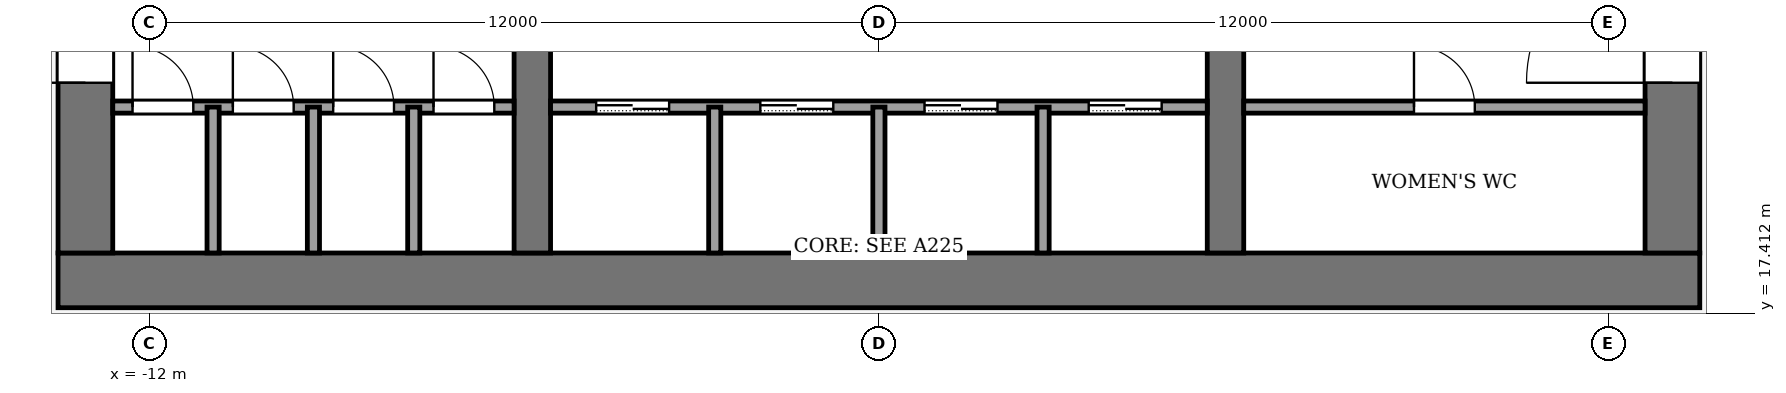
"""IFC4 building model, lengths in metres.
Left out: names, types, materials, properties, quantities, classifications, styles, units other than length and angle.
Written with IfcOpenShell. Run it as: python <this file> out.ifc"""

import sys

from ifc_helpers import new_model, si_unit, direction, frame, frame_2d, origin, place, context, subcontext, project, spatial, rectangle, extrude, element, fill, save


model = new_model("IFC4")
c1 = context("Model", 3, precision=1e-05, world=origin(), true_north=direction((0.0, 1.0)))
c2 = subcontext(c1, "Body", "Model", "MODEL_VIEW")
j1 = project(units=[si_unit("LENGTHUNIT", "METRE"), si_unit("PLANEANGLEUNIT", "RADIAN")], contexts=[c1])
p1 = place(None, origin())
s1 = spatial("IfcSite", under=j1, at=p1, CompositionType="ELEMENT")
p2 = place(p1, origin())
s2 = spatial("IfcBuilding", under=s1, at=p2, CompositionType="ELEMENT")
p3 = place(p2, frame((0.0, 0.0, 222.0)))
s3 = spatial("IfcBuildingStorey", under=s2, at=p3, CompositionType="ELEMENT", Elevation=222.0)
p4 = place(p3, frame((-13.5, 17.95, -0.13), z_axis=(0.0, 0.0, 1.0), x_axis=(1.0, 0.0, 0.0)))
e1 = element("IfcWall", 1, at=p4, inside=s3, PredefinedType="SHEAR", context=c2, shape_type="SweptSolid", body=[
    extrude(rectangle(XDim=27.0, YDim=0.9, at=frame_2d((13.5, 0.0))), origin(), (0.0, 0.0, 1.0), 3.88),
])
p5 = place(p3, frame((-13.05, 18.4, -0.13), z_axis=(0.0, 0.0, 1.0), x_axis=(0.0, 1.0, 0.0)))
e2 = element("IfcWall", 2, at=p5, inside=s3, PredefinedType="SHEAR", context=c2, shape_type="SweptSolid", body=[
    extrude(rectangle(XDim=19.2, YDim=0.9, at=frame_2d((9.6, 0.0))), origin(), (0.0, 0.0, 1.0), 3.88),
])
p6 = place(p5, frame((2.8, 0.0, 0.13)))
e3 = element("IfcOpeningElement", 3, at=p6, cuts=e2, PredefinedType="OPENING", context=c2, shape_type="SweptSolid", body=[
    extrude(rectangle(XDim=2.4, YDim=2.4, at=frame_2d((1.2, 1.2))), frame((0.0, 0.46, 0.0), z_axis=(0.0, -1.0, 0.0), x_axis=(1.0, 0.0, 0.0)), (0.0, 0.0, 1.0), 0.92),
])
p7 = place(p5, frame((13.4, 0.0, 0.13)))
e4 = element("IfcOpeningElement", 4, at=p7, cuts=e2, PredefinedType="OPENING", context=c2, shape_type="SweptSolid", body=[
    extrude(rectangle(XDim=1.4, YDim=2.2, at=frame_2d((0.7, 1.1))), frame((0.0, 0.46, 0.0), z_axis=(0.0, -1.0, 0.0), x_axis=(1.0, 0.0, 0.0)), (0.0, 0.0, 1.0), 0.92),
])
p8 = place(p3, frame((13.05, 18.4, -0.13), z_axis=(0.0, 0.0, 1.0), x_axis=(0.0, 1.0, 0.0)))
e5 = element("IfcWall", 5, at=p8, inside=s3, PredefinedType="SHEAR", context=c2, shape_type="SweptSolid", body=[
    extrude(rectangle(XDim=19.2, YDim=0.9, at=frame_2d((9.6, 0.0))), origin(), (0.0, 0.0, 1.0), 3.88),
])
p9 = place(p8, frame((2.8, 0.0, 0.13)))
e6 = element("IfcOpeningElement", 6, at=p9, cuts=e5, PredefinedType="OPENING", context=c2, shape_type="SweptSolid", body=[
    extrude(rectangle(XDim=2.4, YDim=2.4, at=frame_2d((1.2, 1.2))), frame((0.0, 0.46, 0.0), z_axis=(0.0, -1.0, 0.0), x_axis=(1.0, 0.0, 0.0)), (0.0, 0.0, 1.0), 0.92),
])
p10 = place(p8, frame((13.3, 0.0, 0.13)))
e7 = element("IfcOpeningElement", 7, at=p10, cuts=e5, PredefinedType="OPENING", context=c2, shape_type="SweptSolid", body=[
    extrude(rectangle(XDim=2.4, YDim=2.4, at=frame_2d((1.2, 1.2))), frame((0.0, 0.46, 0.0), z_axis=(0.0, -1.0, 0.0), x_axis=(1.0, 0.0, 0.0)), (0.0, 0.0, 1.0), 0.92),
])
p11 = place(p3, frame((-5.7, 18.4, -0.13), z_axis=(0.0, 0.0, 1.0), x_axis=(0.0, 1.0, 0.0)))
e8 = element("IfcWall", 8, at=p11, inside=s3, PredefinedType="SHEAR", context=c2, shape_type="SweptSolid", body=[
    extrude(rectangle(XDim=19.2, YDim=0.6, at=frame_2d((9.6, 0.0))), origin(), (0.0, 0.0, 1.0), 3.88),
])
p12 = place(p11, frame((8.35, 0.0, 0.13)))
e9 = element("IfcOpeningElement", 9, at=p12, cuts=e8, PredefinedType="OPENING", context=c2, shape_type="SweptSolid", body=[
    extrude(rectangle(XDim=0.9, YDim=2.1, at=frame_2d((0.45, 1.05))), frame((0.0, 0.31, 0.0), z_axis=(0.0, -1.0, 0.0), x_axis=(1.0, 0.0, 0.0)), (0.0, 0.0, 1.0), 0.62),
])
p13 = place(p3, frame((5.7, 18.4, -0.13), z_axis=(0.0, 0.0, 1.0), x_axis=(0.0, 1.0, 0.0)))
e10 = element("IfcWall", 10, at=p13, inside=s3, PredefinedType="SHEAR", context=c2, shape_type="SweptSolid", body=[
    extrude(rectangle(XDim=19.2, YDim=0.6, at=frame_2d((9.6, 0.0))), origin(), (0.0, 0.0, 1.0), 3.88),
])
p14 = place(p13, frame((8.35, 0.0, 0.13)))
e11 = element("IfcOpeningElement", 11, at=p14, cuts=e10, PredefinedType="OPENING", context=c2, shape_type="SweptSolid", body=[
    extrude(rectangle(XDim=0.9, YDim=2.1, at=frame_2d((0.45, 1.05))), frame((0.0, 0.31, 0.0), z_axis=(0.0, -1.0, 0.0), x_axis=(1.0, 0.0, 0.0)), (0.0, 0.0, 1.0), 0.62),
])
p15 = place(p13, frame((13.3, 0.0, 0.13)))
e12 = element("IfcOpeningElement", 12, at=p15, cuts=e10, PredefinedType="OPENING", context=c2, shape_type="SweptSolid", body=[
    extrude(rectangle(XDim=2.4, YDim=2.4, at=frame_2d((1.2, 1.2))), frame((0.0, 0.31, 0.0), z_axis=(0.0, -1.0, 0.0), x_axis=(1.0, 0.0, 0.0)), (0.0, 0.0, 1.0), 0.62),
])
p16 = place(p3, frame((-12.6, 20.8, 0.0), z_axis=(0.0, 0.0, 1.0), x_axis=(1.0, 0.0, 0.0)))
e13 = element("IfcWall", 13, at=p16, inside=s3, PredefinedType="PARTITIONING", context=c2, shape_type="SweptSolid", body=[
    extrude(rectangle(XDim=6.6, YDim=0.2, at=frame_2d((3.3, 0.0))), origin(), (0.0, 0.0, 1.0), 3.75),
])
p17 = place(p16, frame((0.325, 0.0, 0.0)))
e14 = element("IfcOpeningElement", 14, at=p17, cuts=e13, PredefinedType="OPENING", context=c2, shape_type="SweptSolid", body=[
    extrude(rectangle(XDim=1.0, YDim=2.1, at=frame_2d((0.5, 1.05))), frame((0.0, 0.11, 0.0), z_axis=(0.0, -1.0, 0.0), x_axis=(1.0, 0.0, 0.0)), (0.0, 0.0, 1.0), 0.22),
])
p18 = place(p16, frame((1.975, 0.0, 0.0)))
e15 = element("IfcOpeningElement", 15, at=p18, cuts=e13, PredefinedType="OPENING", context=c2, shape_type="SweptSolid", body=[
    extrude(rectangle(XDim=1.0, YDim=2.1, at=frame_2d((0.5, 1.05))), frame((0.0, 0.11, 0.0), z_axis=(0.0, -1.0, 0.0), x_axis=(1.0, 0.0, 0.0)), (0.0, 0.0, 1.0), 0.22),
])
p19 = place(p16, frame((3.625, 0.0, 0.0)))
e16 = element("IfcOpeningElement", 16, at=p19, cuts=e13, PredefinedType="OPENING", context=c2, shape_type="SweptSolid", body=[
    extrude(rectangle(XDim=1.0, YDim=2.1, at=frame_2d((0.5, 1.05))), frame((0.0, 0.11, 0.0), z_axis=(0.0, -1.0, 0.0), x_axis=(1.0, 0.0, 0.0)), (0.0, 0.0, 1.0), 0.22),
])
p20 = place(p16, frame((5.275, 0.0, 0.0)))
e17 = element("IfcOpeningElement", 17, at=p20, cuts=e13, PredefinedType="OPENING", context=c2, shape_type="SweptSolid", body=[
    extrude(rectangle(XDim=1.0, YDim=2.1, at=frame_2d((0.5, 1.05))), frame((0.0, 0.11, 0.0), z_axis=(0.0, -1.0, 0.0), x_axis=(1.0, 0.0, 0.0)), (0.0, 0.0, 1.0), 0.22),
])
p21 = place(p3, frame((-5.4, 20.8, 0.0), z_axis=(0.0, 0.0, 1.0), x_axis=(1.0, 0.0, 0.0)))
e18 = element("IfcWall", 18, at=p21, inside=s3, PredefinedType="PARTITIONING", context=c2, shape_type="SweptSolid", body=[
    extrude(rectangle(XDim=10.8, YDim=0.2, at=frame_2d((5.4, 0.0))), origin(), (0.0, 0.0, 1.0), 3.75),
])
p22 = place(p21, frame((0.75, 0.0, 0.0)))
e19 = element("IfcOpeningElement", 19, at=p22, cuts=e18, PredefinedType="OPENING", context=c2, shape_type="SweptSolid", body=[
    extrude(rectangle(XDim=1.2, YDim=2.2, at=frame_2d((0.6, 1.1))), frame((0.0, 0.11, 0.0), z_axis=(0.0, -1.0, 0.0), x_axis=(1.0, 0.0, 0.0)), (0.0, 0.0, 1.0), 0.22),
])
p23 = place(p21, frame((3.45, 0.0, 0.0)))
e20 = element("IfcOpeningElement", 20, at=p23, cuts=e18, PredefinedType="OPENING", context=c2, shape_type="SweptSolid", body=[
    extrude(rectangle(XDim=1.2, YDim=2.2, at=frame_2d((0.6, 1.1))), frame((0.0, 0.11, 0.0), z_axis=(0.0, -1.0, 0.0), x_axis=(1.0, 0.0, 0.0)), (0.0, 0.0, 1.0), 0.22),
])
p24 = place(p21, frame((6.15, 0.0, 0.0)))
e21 = element("IfcOpeningElement", 21, at=p24, cuts=e18, PredefinedType="OPENING", context=c2, shape_type="SweptSolid", body=[
    extrude(rectangle(XDim=1.2, YDim=2.2, at=frame_2d((0.6, 1.1))), frame((0.0, 0.11, 0.0), z_axis=(0.0, -1.0, 0.0), x_axis=(1.0, 0.0, 0.0)), (0.0, 0.0, 1.0), 0.22),
])
p25 = place(p21, frame((8.85, 0.0, 0.0)))
e22 = element("IfcOpeningElement", 22, at=p25, cuts=e18, PredefinedType="OPENING", context=c2, shape_type="SweptSolid", body=[
    extrude(rectangle(XDim=1.2, YDim=2.2, at=frame_2d((0.6, 1.1))), frame((0.0, 0.11, 0.0), z_axis=(0.0, -1.0, 0.0), x_axis=(1.0, 0.0, 0.0)), (0.0, 0.0, 1.0), 0.22),
])
p26 = place(p3, frame((6.0, 20.8, 0.0), z_axis=(0.0, 0.0, 1.0), x_axis=(1.0, 0.0, 0.0)))
e23 = element("IfcWall", 23, at=p26, inside=s3, PredefinedType="PARTITIONING", context=c2, shape_type="SweptSolid", body=[
    extrude(rectangle(XDim=6.6, YDim=0.2, at=frame_2d((3.3, 0.0))), origin(), (0.0, 0.0, 1.0), 3.75),
])
p27 = place(p26, frame((2.8, 0.0, 0.0)))
e24 = element("IfcOpeningElement", 24, at=p27, cuts=e23, PredefinedType="OPENING", context=c2, shape_type="SweptSolid", body=[
    extrude(rectangle(XDim=1.0, YDim=2.1, at=frame_2d((0.5, 1.05))), frame((0.0, 0.11, 0.0), z_axis=(0.0, -1.0, 0.0), x_axis=(1.0, 0.0, 0.0)), (0.0, 0.0, 1.0), 0.22),
])
for number, where, z_axis, x_axis in (
    (25, (-10.95, 18.4, 0.0), (0.0, 0.0, 1.0), (0.0, 1.0, 0.0)),
    (26, (-9.3, 18.4, 0.0), (0.0, 0.0, 1.0), (0.0, 1.0, 0.0)),
    (27, (-7.65, 18.4, 0.0), (0.0, 0.0, 1.0), (0.0, 1.0, 0.0)),
    (28, (-2.7, 18.4, 0.0), (0.0, 0.0, 1.0), (0.0, 1.0, 0.0)),
    (29, (0.0, 18.4, 0.0), (0.0, 0.0, 1.0), (0.0, 1.0, 0.0)),
    (30, (2.7, 18.4, 0.0), (0.0, 0.0, 1.0), (0.0, 1.0, 0.0)),
):
    element("IfcWall", number, at=place(p3, frame(where, z_axis=z_axis, x_axis=x_axis)), inside=s3, PredefinedType="PARTITIONING", context=c2, shape_type="SweptSolid", body=[
        extrude(rectangle(XDim=2.4, YDim=0.2, at=frame_2d((1.2, 0.0))), origin(), (0.0, 0.0, 1.0), 3.75),
    ])
p28 = place(p22, origin())
e31 = element("IfcDoor", 31, at=p28, inside=s3, OperationType="SLIDING_TO_LEFT", PredefinedType="DOOR", context=c2, shape_type="SweptSolid", body=[
    extrude(rectangle(XDim=1.2, YDim=2.2, at=frame_2d((0.6, 1.1))), frame((0.0, 0.025, 0.0), z_axis=(0.0, -1.0, 0.0), x_axis=(1.0, 0.0, 0.0)), (0.0, 0.0, 1.0), 0.05),
])
fill(e19, e31)
p29 = place(p23, origin())
e32 = element("IfcDoor", 32, at=p29, inside=s3, OperationType="SLIDING_TO_LEFT", PredefinedType="DOOR", context=c2, shape_type="SweptSolid", body=[
    extrude(rectangle(XDim=1.2, YDim=2.2, at=frame_2d((0.6, 1.1))), frame((0.0, 0.025, 0.0), z_axis=(0.0, -1.0, 0.0), x_axis=(1.0, 0.0, 0.0)), (0.0, 0.0, 1.0), 0.05),
])
fill(e20, e32)
p30 = place(p24, origin())
e33 = element("IfcDoor", 33, at=p30, inside=s3, OperationType="SLIDING_TO_LEFT", PredefinedType="DOOR", context=c2, shape_type="SweptSolid", body=[
    extrude(rectangle(XDim=1.2, YDim=2.2, at=frame_2d((0.6, 1.1))), frame((0.0, 0.025, 0.0), z_axis=(0.0, -1.0, 0.0), x_axis=(1.0, 0.0, 0.0)), (0.0, 0.0, 1.0), 0.05),
])
fill(e21, e33)
p31 = place(p25, origin())
e34 = element("IfcDoor", 34, at=p31, inside=s3, OperationType="SLIDING_TO_LEFT", PredefinedType="DOOR", context=c2, shape_type="SweptSolid", body=[
    extrude(rectangle(XDim=1.2, YDim=2.2, at=frame_2d((0.6, 1.1))), frame((0.0, 0.025, 0.0), z_axis=(0.0, -1.0, 0.0), x_axis=(1.0, 0.0, 0.0)), (0.0, 0.0, 1.0), 0.05),
])
fill(e22, e34)
p32 = place(p17, origin())
e35 = element("IfcDoor", 35, at=p32, inside=s3, OperationType="SINGLE_SWING_RIGHT", PredefinedType="DOOR", context=c2, shape_type="SweptSolid", body=[
    extrude(rectangle(XDim=1.0, YDim=2.1, at=frame_2d((0.5, 1.05))), frame((0.0, 0.025, 0.0), z_axis=(0.0, -1.0, 0.0), x_axis=(1.0, 0.0, 0.0)), (0.0, 0.0, 1.0), 0.05),
])
fill(e14, e35)
p33 = place(p18, origin())
e36 = element("IfcDoor", 36, at=p33, inside=s3, OperationType="SINGLE_SWING_RIGHT", PredefinedType="DOOR", context=c2, shape_type="SweptSolid", body=[
    extrude(rectangle(XDim=1.0, YDim=2.1, at=frame_2d((0.5, 1.05))), frame((0.0, 0.025, 0.0), z_axis=(0.0, -1.0, 0.0), x_axis=(1.0, 0.0, 0.0)), (0.0, 0.0, 1.0), 0.05),
])
fill(e15, e36)
p34 = place(p19, origin())
e37 = element("IfcDoor", 37, at=p34, inside=s3, OperationType="SINGLE_SWING_LEFT", PredefinedType="DOOR", context=c2, shape_type="SweptSolid", body=[
    extrude(rectangle(XDim=1.0, YDim=2.1, at=frame_2d((0.5, 1.05))), frame((0.0, 0.025, 0.0), z_axis=(0.0, -1.0, 0.0), x_axis=(1.0, 0.0, 0.0)), (0.0, 0.0, 1.0), 0.05),
])
fill(e16, e37)
p35 = place(p20, origin())
e38 = element("IfcDoor", 38, at=p35, inside=s3, OperationType="SINGLE_SWING_LEFT", PredefinedType="DOOR", context=c2, shape_type="SweptSolid", body=[
    extrude(rectangle(XDim=1.0, YDim=2.1, at=frame_2d((0.5, 1.05))), frame((0.0, 0.025, 0.0), z_axis=(0.0, -1.0, 0.0), x_axis=(1.0, 0.0, 0.0)), (0.0, 0.0, 1.0), 0.05),
])
fill(e17, e38)
p36 = place(p27, origin())
e39 = element("IfcDoor", 39, at=p36, inside=s3, OperationType="SINGLE_SWING_LEFT", PredefinedType="DOOR", context=c2, shape_type="SweptSolid", body=[
    extrude(rectangle(XDim=1.0, YDim=2.1, at=frame_2d((0.5, 1.05))), frame((0.0, 0.025, 0.0), z_axis=(0.0, -1.0, 0.0), x_axis=(1.0, 0.0, 0.0)), (0.0, 0.0, 1.0), 0.05),
])
fill(e24, e39)
p37 = place(p6, origin())
e40 = element("IfcDoor", 40, at=p37, inside=s3, OperationType="DOUBLE_DOOR_SINGLE_SWING", PredefinedType="DOOR", context=c2, shape_type="SweptSolid", body=[
    extrude(rectangle(XDim=2.4, YDim=2.4, at=frame_2d((1.2, 1.2))), frame((0.0, 0.025, 0.0), z_axis=(0.0, -1.0, 0.0), x_axis=(1.0, 0.0, 0.0)), (0.0, 0.0, 1.0), 0.05),
])
fill(e3, e40)
p38 = place(p9, origin())
e41 = element("IfcDoor", 41, at=p38, inside=s3, OperationType="DOUBLE_DOOR_SINGLE_SWING", PredefinedType="DOOR", context=c2, shape_type="SweptSolid", body=[
    extrude(rectangle(XDim=2.4, YDim=2.4, at=frame_2d((1.2, 1.2))), frame((0.0, 0.025, 0.0), z_axis=(0.0, -1.0, 0.0), x_axis=(1.0, 0.0, 0.0)), (0.0, 0.0, 1.0), 0.05),
])
fill(e6, e41)
save(model, sys.argv[1])
